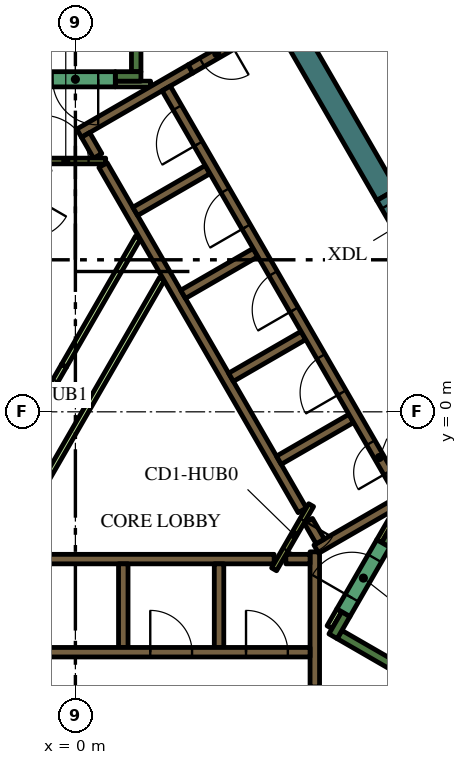
"""IFC4 building model, lengths in metres.
Left out: names, types, materials, properties, quantities, classifications, styles, units other than length and angle.
Written with IfcOpenShell. Run it as: python <this file> out.ifc"""

import sys

from ifc_helpers import new_model, si_unit, direction, frame, frame_2d, origin, place, context, subcontext, project, spatial, rectangle, extrude, element, fill, save


model = new_model("IFC4")
c1 = context("Model", 3, precision=1e-05, world=origin(), true_north=direction((0.0, 1.0)))
c2 = subcontext(c1, "Body", "Model", "MODEL_VIEW")
j1 = project(units=[si_unit("LENGTHUNIT", "METRE"), si_unit("PLANEANGLEUNIT", "RADIAN")], contexts=[c1])
p1 = place(None, origin())
s1 = spatial("IfcSite", under=j1, at=p1, CompositionType="ELEMENT")
p2 = place(p1, origin())
s2 = spatial("IfcBuilding", under=s1, at=p2, CompositionType="ELEMENT")
p3 = place(p2, frame((0.0, 0.0, 296.4)))
s3 = spatial("IfcBuildingStorey", under=s2, at=p3, CompositionType="ELEMENT", Elevation=296.4)
p4 = place(p3, frame((8.192, 5.711, 0.0), z_axis=(0.0, 0.0, 1.0), x_axis=(-0.500006836656, 0.866021456604, 0.0)))
e1 = element("IfcWall", 1, at=p4, inside=s3, PredefinedType="SOLIDWALL", context=c2, shape_type="SweptSolid", body=[
    extrude(rectangle(XDim=5.078, YDim=0.6, at=frame_2d((2.539, 0.0))), origin(), (0.0, 0.0, 1.0), 4.2),
])
p5 = place(p3, frame((12.84, -9.261, 0.0), z_axis=(0.0, 0.0, 1.0), x_axis=(-0.866013990052, 0.500019768644, 0.0)))
e2 = element("IfcWall", 2, at=p5, inside=s3, PredefinedType="SOLIDWALL", context=c2, shape_type="SweptSolid", body=[
    extrude(rectangle(XDim=6.8, YDim=0.25, at=frame_2d((3.4, 0.0))), origin(), (0.0, 0.0, 1.0), 4.2),
])
p6 = place(p3, frame((6.78, -5.906, 0.0), z_axis=(0.0, 0.0, 1.0), x_axis=(0.500223362819, 0.865896406789, 0.0)))
e3 = element("IfcWall", 3, at=p6, inside=s3, PredefinedType="SOLIDWALL", context=c2, shape_type="SweptSolid", body=[
    extrude(rectangle(XDim=0.675, YDim=0.25, at=frame_2d((0.337, 0.0))), origin(), (0.0, 0.0, 1.0), 4.2),
])
p7 = place(p3, frame((8.168, -3.503, 0.0), z_axis=(0.0, 0.0, 1.0), x_axis=(0.49972245349, 0.866185586049, 0.0)))
e4 = element("IfcWall", 4, at=p7, inside=s3, PredefinedType="SOLIDWALL", context=c2, shape_type="SweptSolid", body=[
    extrude(rectangle(XDim=0.425, YDim=0.25, at=frame_2d((0.212, 0.0))), origin(), (0.0, 0.0, 1.0), 4.2),
])
p8 = place(p3, frame((1.6, 8.95, 0.0), z_axis=(0.0, 0.0, 1.0), x_axis=(0.0, 1.0, 0.0)))
e5 = element("IfcWall", 5, at=p8, inside=s3, PredefinedType="SOLIDWALL", context=c2, shape_type="SweptSolid", body=[
    extrude(rectangle(XDim=6.8, YDim=0.25, at=frame_2d((3.4, 0.0))), origin(), (0.0, 0.0, 1.0), 4.2),
])
p9 = place(p3, frame((1.05, 8.825, 0.0), z_axis=(0.0, 0.0, 1.0), x_axis=(1.0, 0.0, 0.0)))
e6 = element("IfcWall", 6, at=p9, inside=s3, PredefinedType="SOLIDWALL", context=c2, shape_type="SweptSolid", body=[
    extrude(rectangle(XDim=0.675, YDim=0.25, at=frame_2d((0.337, 0.0))), origin(), (0.0, 0.0, 1.0), 4.2),
])
p10 = place(p3, frame((6.3, -7.24, 0.0), z_axis=(0.0, 0.0, 1.0), x_axis=(0.0, 1.0, 0.0)))
e7 = element("IfcWall", 7, at=p10, inside=s3, PredefinedType="SOLIDWALL", context=c2, shape_type="SweptSolid", body=[
    extrude(rectangle(XDim=3.556, YDim=0.25, at=frame_2d((1.778, 0.0))), origin(), (0.0, 0.0, 1.0), 4.2),
])
p11 = place(p3, frame((5.538, -3.875, 0.0), z_axis=(0.0, 0.0, 1.0), x_axis=(1.0, 0.0, 0.0)))
e8 = element("IfcWall", 8, at=p11, inside=s3, PredefinedType="SOLIDWALL", context=c2, shape_type="SweptSolid", body=[
    extrude(rectangle(XDim=0.637, YDim=0.25, at=frame_2d((0.318, 0.0))), origin(), (0.0, 0.0, 1.0), 4.2),
])
p12 = place(p3, frame((-5.259, -3.875, 0.0), z_axis=(0.0, 0.0, 1.0), x_axis=(1.0, 0.0, 0.0)))
e9 = element("IfcWall", 9, at=p12, inside=s3, PredefinedType="SOLIDWALL", context=c2, shape_type="SweptSolid", body=[
    extrude(rectangle(XDim=10.489, YDim=0.25, at=frame_2d((5.244, 0.0))), origin(), (0.0, 0.0, 1.0), 4.2),
])
for number, where, z_axis, x_axis in (
    (10, (1.26, -4.0, 0.0), (0.0, 0.0, 1.0), (0.0, -1.0, 0.0)),
    (11, (3.78, -4.0, 0.0), (0.0, 0.0, 1.0), (0.0, -1.0, 0.0)),
):
    element("IfcWall", number, at=place(p3, frame(where, z_axis=z_axis, x_axis=x_axis)), inside=s3, PredefinedType="SOLIDWALL", context=c2, shape_type="SweptSolid", body=[
        extrude(rectangle(XDim=2.2, YDim=0.25, at=frame_2d((1.1, 0.0))), origin(), (0.0, 0.0, 1.0), 4.2),
    ])
p13 = place(p3, frame((9.19, -1.969, 0.0), z_axis=(0.0, 0.0, 1.0), x_axis=(-0.866057109641, -0.499945079824, 0.0)))
e12 = element("IfcWall", 12, at=p13, inside=s3, PredefinedType="SOLIDWALL", context=c2, shape_type="SweptSolid", body=[
    extrude(rectangle(XDim=3.291, YDim=0.25, at=frame_2d((1.646, 0.0))), origin(), (0.0, 0.0, 1.0), 4.2),
])
p14 = place(p3, frame((6.13, -2.867, 0.0), z_axis=(0.0, 0.0, 1.0), x_axis=(0.500160776593, -0.865932559475, 0.0)))
e13 = element("IfcWall", 13, at=p14, inside=s3, PredefinedType="SOLIDWALL", context=c2, shape_type="SweptSolid", body=[
    extrude(rectangle(XDim=0.627, YDim=0.25, at=frame_2d((0.313, 0.0))), origin(), (0.0, 0.0, 1.0), 4.2),
])
p15 = place(p3, frame((3.028, 9.023, 0.0), z_axis=(0.0, 0.0, 1.0), x_axis=(-0.866036587186, -0.49998062928, 0.0)))
e14 = element("IfcWall", 14, at=p15, inside=s3, PredefinedType="SOLIDWALL", context=c2, shape_type="SweptSolid", body=[
    extrude(rectangle(XDim=3.384, YDim=0.25, at=frame_2d((1.692, 0.0))), origin(), (0.0, 0.0, 1.0), 4.2),
])
p16 = place(p3, frame((0.268, 7.285, 0.0), z_axis=(0.0, 0.0, 1.0), x_axis=(0.500098681536, -0.865968422476, 0.0)))
e15 = element("IfcWall", 15, at=p16, inside=s3, PredefinedType="SOLIDWALL", context=c2, shape_type="SweptSolid", body=[
    extrude(rectangle(XDim=0.636, YDim=0.25, at=frame_2d((0.318, 0.0))), origin(), (0.0, 0.0, 1.0), 4.2),
])
p17 = place(p3, frame((5.97, -2.591, 0.0), z_axis=(0.0, 0.0, 1.0), x_axis=(-0.499994469932, 0.866028596547, 0.0)))
e16 = element("IfcWall", 16, at=p17, inside=s3, PredefinedType="SOLIDWALL", context=c2, shape_type="SweptSolid", body=[
    extrude(rectangle(XDim=10.488, YDim=0.25, at=frame_2d((5.244, 0.0))), origin(), (0.0, 0.0, 1.0), 4.2),
])
p18 = place(p3, frame((1.574, 5.274, 0.0), z_axis=(0.0, 0.0, 1.0), x_axis=(0.866028486751, 0.499994660107, 0.0)))
e17 = element("IfcWall", 17, at=p18, inside=s3, PredefinedType="SOLIDWALL", context=c2, shape_type="SweptSolid", body=[
    extrude(rectangle(XDim=2.2, YDim=0.25, at=frame_2d((1.1, 0.0))), origin(), (0.0, 0.0, 1.0), 4.2),
])
for number, where, z_axis, x_axis in (
    (18, (2.834, 3.091, 0.0), (0.0, 0.0, 1.0), (0.866, 0.5, 0.0)),
    (19, (4.094, 0.909, 0.0), (0.0, 0.0, 1.0), (0.866, 0.5, 0.0)),
    (20, (5.354, -1.274, 0.0), (0.0, 0.0, 1.0), (0.866, 0.5, 0.0)),
):
    element("IfcWall", number, at=place(p3, frame(where, z_axis=z_axis, x_axis=x_axis)), inside=s3, PredefinedType="SOLIDWALL", context=c2, shape_type="SweptSolid", body=[
        extrude(rectangle(XDim=2.2, YDim=0.25, at=frame_2d((1.1, 0.0))), origin(), (0.0, 0.0, 1.0), 4.2),
    ])
p19 = place(p3, frame((1.05, 8.625, 0.0), z_axis=(0.0, 0.0, 1.0), x_axis=(1.0, 0.0, 0.0)))
e21 = element("IfcWall", 21, at=p19, inside=s3, PredefinedType="PARTITIONING", context=c2, shape_type="SweptSolid", body=[
    extrude(rectangle(XDim=0.929, YDim=0.15, at=frame_2d((0.464, 0.0))), origin(), (0.0, 0.0, 1.0), 3.55),
])
p20 = place(p3, frame((6.945, -5.222, 0.0), z_axis=(0.0, 0.0, 1.0), x_axis=(-0.499818422106, -0.866130212453, 0.0)))
e22 = element("IfcWall", 22, at=p20, inside=s3, PredefinedType="PARTITIONING", context=c2, shape_type="SweptSolid", body=[
    extrude(rectangle(XDim=0.514, YDim=0.15, at=frame_2d((0.257, 0.0))), origin(), (0.0, 0.0, 1.0), 3.55),
])
p21 = place(p3, frame((8.459, -2.599, 0.0), z_axis=(0.0, 0.0, 1.0), x_axis=(-0.500041054325, -0.866001699761, 0.0)))
e23 = element("IfcWall", 23, at=p21, inside=s3, PredefinedType="PARTITIONING", context=c2, shape_type="SweptSolid", body=[
    extrude(rectangle(XDim=0.929, YDim=0.15, at=frame_2d((0.464, 0.0))), origin(), (0.0, 0.0, 1.0), 4.2),
])
p22 = place(p3, frame((-1.887, -3.718, 0.0), z_axis=(0.0, 0.0, 1.0), x_axis=(0.500005008002, 0.866022512394, 0.0)))
e24 = element("IfcWall", 24, at=p22, inside=s3, PredefinedType="PARTITIONING", context=c2, shape_type="SweptSolid", body=[
    extrude(rectangle(XDim=8.327, YDim=0.15, at=frame_2d((4.164, 0.0))), origin(), (0.0, 0.0, 1.0), 3.55),
])
p23 = place(p3, frame((-0.3, 1.212, 0.0), z_axis=(0.0, 0.0, 1.0), x_axis=(0.499963101113, 0.866046706318, 0.0)))
e25 = element("IfcWall", 25, at=p23, inside=s3, PredefinedType="PARTITIONING", context=c2, shape_type="SweptSolid", body=[
    extrude(rectangle(XDim=3.893, YDim=0.15, at=frame_2d((1.947, 0.0))), origin(), (0.0, 0.0, 1.0), 3.55),
])
p24 = place(p3, frame((-6.175, -6.325, 0.0), z_axis=(0.0, 0.0, 1.0), x_axis=(1.0, 0.0, 0.0)))
e26 = element("IfcWall", 26, at=p24, inside=s3, PredefinedType="SOLIDWALL", context=c2, shape_type="SweptSolid", body=[
    extrude(rectangle(XDim=12.35, YDim=0.25, at=frame_2d((6.175, 0.0))), origin(), (0.0, 0.0, 1.0), 4.2),
])
p25 = place(p24, frame((3.205, 0.0, 0.0)))
e27 = element("IfcOpeningElement", 27, at=p25, cuts=e26, PredefinedType="OPENING", context=c2, shape_type="SweptSolid", body=[
    extrude(rectangle(XDim=0.9, YDim=2.1, at=frame_2d((0.45, 1.05))), frame((0.0, 0.135, 0.0), z_axis=(0.0, -1.0, 0.0), x_axis=(1.0, 0.0, 0.0)), (0.0, 0.0, 1.0), 0.27),
])
p26 = place(p24, frame((8.145, 0.0, 0.0)))
e28 = element("IfcOpeningElement", 28, at=p26, cuts=e26, PredefinedType="OPENING", context=c2, shape_type="SweptSolid", body=[
    extrude(rectangle(XDim=1.1, YDim=2.1, at=frame_2d((0.55, 1.05))), frame((0.0, 0.135, 0.0), z_axis=(0.0, -1.0, 0.0), x_axis=(1.0, 0.0, 0.0)), (0.0, 0.0, 1.0), 0.27),
])
p27 = place(p24, frame((10.665, 0.0, 0.0)))
e29 = element("IfcOpeningElement", 29, at=p27, cuts=e26, PredefinedType="OPENING", context=c2, shape_type="SweptSolid", body=[
    extrude(rectangle(XDim=1.1, YDim=2.1, at=frame_2d((0.55, 1.05))), frame((0.0, 0.135, 0.0), z_axis=(0.0, -1.0, 0.0), x_axis=(1.0, 0.0, 0.0)), (0.0, 0.0, 1.0), 0.27),
])
p28 = place(p3, frame((8.565, -2.185, 0.0), z_axis=(0.0, 0.0, 1.0), x_axis=(-0.499997954832, 0.866026584559, 0.0)))
e30 = element("IfcWall", 30, at=p28, inside=s3, PredefinedType="SOLIDWALL", context=c2, shape_type="SweptSolid", body=[
    extrude(rectangle(XDim=12.35, YDim=0.25, at=frame_2d((6.175, 0.0))), origin(), (0.0, 0.0, 1.0), 4.2),
])
p29 = place(p28, frame((0.685, 0.0, 0.0)))
e31 = element("IfcOpeningElement", 31, at=p29, cuts=e30, PredefinedType="OPENING", context=c2, shape_type="SweptSolid", body=[
    extrude(rectangle(XDim=0.9, YDim=2.1, at=frame_2d((0.45, 1.05))), frame((0.0, 0.135, 0.0), z_axis=(0.0, -1.0, 0.0), x_axis=(1.0, 0.0, 0.0)), (0.0, 0.0, 1.0), 0.27),
])
p30 = place(p28, frame((3.105, 0.0, 0.0)))
e32 = element("IfcOpeningElement", 32, at=p30, cuts=e30, PredefinedType="OPENING", context=c2, shape_type="SweptSolid", body=[
    extrude(rectangle(XDim=1.1, YDim=2.1, at=frame_2d((0.55, 1.05))), frame((0.0, 0.135, 0.0), z_axis=(0.0, -1.0, 0.0), x_axis=(1.0, 0.0, 0.0)), (0.0, 0.0, 1.0), 0.27),
])
p31 = place(p28, frame((5.625, 0.0, 0.0)))
e33 = element("IfcOpeningElement", 33, at=p31, cuts=e30, PredefinedType="OPENING", context=c2, shape_type="SweptSolid", body=[
    extrude(rectangle(XDim=1.1, YDim=2.1, at=frame_2d((0.55, 1.05))), frame((0.0, 0.135, 0.0), z_axis=(0.0, -1.0, 0.0), x_axis=(1.0, 0.0, 0.0)), (0.0, 0.0, 1.0), 0.27),
])
p32 = place(p28, frame((8.145, 0.0, 0.0)))
e34 = element("IfcOpeningElement", 34, at=p32, cuts=e30, PredefinedType="OPENING", context=c2, shape_type="SweptSolid", body=[
    extrude(rectangle(XDim=1.1, YDim=2.1, at=frame_2d((0.55, 1.05))), frame((0.0, 0.135, 0.0), z_axis=(0.0, -1.0, 0.0), x_axis=(1.0, 0.0, 0.0)), (0.0, 0.0, 1.0), 0.27),
])
p33 = place(p28, frame((10.665, 0.0, 0.0)))
e35 = element("IfcOpeningElement", 35, at=p33, cuts=e30, PredefinedType="OPENING", context=c2, shape_type="SweptSolid", body=[
    extrude(rectangle(XDim=1.1, YDim=2.1, at=frame_2d((0.55, 1.05))), frame((0.0, 0.135, 0.0), z_axis=(0.0, -1.0, 0.0), x_axis=(1.0, 0.0, 0.0)), (0.0, 0.0, 1.0), 0.27),
])
p34 = place(p3, frame((7.053, -5.284, 0.0), z_axis=(0.0, 0.0, 1.0), x_axis=(0.500078061341, 0.865980330357, 0.0)))
e36 = element("IfcWall", 36, at=p34, inside=s3, PredefinedType="SOLIDWALL", context=c2, shape_type="SweptSolid", body=[
    extrude(rectangle(XDim=2.1, YDim=0.4, at=frame_2d((1.05, 0.0))), origin(), (0.0, 0.0, 1.0), 4.2),
])
p35 = place(p34, frame((0.45, 0.0, 0.0)))
e37 = element("IfcOpeningElement", 37, at=p35, cuts=e36, PredefinedType="OPENING", context=c2, shape_type="SweptSolid", body=[
    extrude(rectangle(XDim=1.2, YDim=2.1, at=frame_2d((0.6, 1.05))), frame((0.0, 0.21, 0.0), z_axis=(0.0, -1.0, 0.0), x_axis=(1.0, 0.0, 0.0)), (0.0, 0.0, 1.0), 0.42),
])
p36 = place(p3, frame((1.05, 8.75, 0.0), z_axis=(0.0, 0.0, 1.0), x_axis=(-1.0, 0.0, 0.0)))
e38 = element("IfcWall", 38, at=p36, inside=s3, PredefinedType="SOLIDWALL", context=c2, shape_type="SweptSolid", body=[
    extrude(rectangle(XDim=2.1, YDim=0.4, at=frame_2d((1.05, 0.0))), origin(), (0.0, 0.0, 1.0), 4.2),
])
p37 = place(p36, frame((0.45, 0.0, 0.0)))
e39 = element("IfcOpeningElement", 39, at=p37, cuts=e38, PredefinedType="OPENING", context=c2, shape_type="SweptSolid", body=[
    extrude(rectangle(XDim=1.2, YDim=2.1, at=frame_2d((0.6, 1.05))), frame((0.0, 0.21, 0.0), z_axis=(0.0, -1.0, 0.0), x_axis=(1.0, 0.0, 0.0)), (0.0, 0.0, 1.0), 0.42),
])
p38 = place(p3, frame((5.366, 10.373, 0.0), z_axis=(0.0, 0.0, 1.0), x_axis=(-0.866019956843, -0.50000943426, 0.0)))
e40 = element("IfcWall", 40, at=p38, inside=s3, PredefinedType="SOLIDWALL", context=c2, shape_type="SweptSolid", body=[
    extrude(rectangle(XDim=2.7, YDim=0.25, at=frame_2d((1.35, 0.0))), origin(), (0.0, 0.0, 1.0), 4.2),
])
p39 = place(p38, frame((1.45, 0.0, 0.0)))
e41 = element("IfcOpeningElement", 41, at=p39, cuts=e40, PredefinedType="OPENING", context=c2, shape_type="SweptSolid", body=[
    extrude(rectangle(XDim=0.9, YDim=2.1, at=frame_2d((0.45, 1.05))), frame((0.0, 0.135, 0.0), z_axis=(0.0, -1.0, 0.0), x_axis=(1.0, 0.0, 0.0)), (0.0, 0.0, 1.0), 0.27),
])
p40 = place(p3, frame((6.203, -2.456, 0.0), z_axis=(0.0, 0.0, 1.0), x_axis=(-0.500043961785, -0.866000020948, 0.0)))
e42 = element("IfcWall", 42, at=p40, inside=s3, PredefinedType="PARTITIONING", context=c2, shape_type="SweptSolid", body=[
    extrude(rectangle(XDim=1.95, YDim=0.15, at=frame_2d((0.975, 0.0))), origin(), (0.0, 0.0, 1.0), 4.2),
])
p41 = place(p40, frame((0.45, 0.0, 0.0)))
e43 = element("IfcOpeningElement", 43, at=p41, cuts=e42, PredefinedType="OPENING", context=c2, shape_type="SweptSolid", body=[
    extrude(rectangle(XDim=0.9, YDim=2.1, at=frame_2d((0.45, 1.05))), frame((0.0, 0.085, 0.0), z_axis=(0.0, -1.0, 0.0), x_axis=(1.0, 0.0, 0.0)), (0.0, 0.0, 1.0), 0.17),
])
p42 = place(p3, frame((-1.303, 6.6, 0.0), z_axis=(0.0, 0.0, 1.0), x_axis=(1.0, 0.0, 0.0)))
e44 = element("IfcWall", 44, at=p42, inside=s3, PredefinedType="PARTITIONING", context=c2, shape_type="SweptSolid", body=[
    extrude(rectangle(XDim=2.1, YDim=0.15, at=frame_2d((1.05, 0.0))), origin(), (0.0, 0.0, 1.0), 4.2),
])
p43 = place(p42, frame((0.45, 0.0, 0.0)))
e45 = element("IfcOpeningElement", 45, at=p43, cuts=e44, PredefinedType="OPENING", context=c2, shape_type="SweptSolid", body=[
    extrude(rectangle(XDim=1.2, YDim=2.1, at=frame_2d((0.6, 1.05))), frame((0.0, 0.085, 0.0), z_axis=(0.0, -1.0, 0.0), x_axis=(1.0, 0.0, 0.0)), (0.0, 0.0, 1.0), 0.17),
])
p44 = place(p3, frame((8.192, 5.711, 0.0), z_axis=(0.0, 0.0, 1.0), x_axis=(0.500062241894, -0.865989465428, 0.0)))
e46 = element("IfcWall", 46, at=p44, inside=s3, PredefinedType="SOLIDWALL", context=c2, shape_type="SweptSolid", body=[
    extrude(rectangle(XDim=1.7, YDim=0.6, at=frame_2d((0.85, 0.0))), origin(), (0.0, 0.0, 1.0), 4.2),
])
p45 = place(p44, frame((0.25, 0.0, 0.0)))
e47 = element("IfcOpeningElement", 47, at=p45, cuts=e46, PredefinedType="OPENING", context=c2, shape_type="SweptSolid", body=[
    extrude(rectangle(XDim=1.2, YDim=2.1, at=frame_2d((0.6, 1.05))), frame((0.0, 0.31, 0.0), z_axis=(0.0, -1.0, 0.0), x_axis=(1.0, 0.0, 0.0)), (0.0, 0.0, 1.0), 0.62),
])
p46 = place(p3, frame((-1.2, -0.346, 0.0), z_axis=(0.0, 0.0, 1.0), x_axis=(0.499961193289, 0.866047807691, 0.0)))
e48 = element("IfcWall", 48, at=p46, inside=s3, PredefinedType="PARTITIONING", context=c2, shape_type="SweptSolid", body=[
    extrude(rectangle(XDim=1.8, YDim=0.15, at=frame_2d((0.9, 0.0))), origin(), (0.0, 0.0, 1.0), 3.55),
])
p47 = place(p46, frame((0.45, 0.0, 0.0)))
e49 = element("IfcOpeningElement", 49, at=p47, cuts=e48, PredefinedType="OPENING", context=c2, shape_type="SweptSolid", body=[
    extrude(rectangle(XDim=0.9, YDim=2.1, at=frame_2d((0.45, 1.05))), frame((0.0, 0.085, 0.0), z_axis=(0.0, -1.0, 0.0), x_axis=(1.0, 0.0, 0.0)), (0.0, 0.0, 1.0), 0.17),
])
p48 = place(p3, frame((13.436, 0.829, 0.0), z_axis=(0.0, 0.0, 1.0), x_axis=(-0.49999894854, 0.866026010844, 0.0)))
e50 = element("IfcWall", 50, at=p48, inside=s3, PredefinedType="PARTITIONING", context=c2, shape_type="SweptSolid", body=[
    extrude(rectangle(XDim=12.0, YDim=0.2, at=frame_2d((6.0, 0.0))), origin(), (0.0, 0.0, 1.0), 3.55),
])
p49 = place(p48, frame((5.5, 0.0, 0.0)))
e51 = element("IfcOpeningElement", 51, at=p49, cuts=e50, PredefinedType="OPENING", context=c2, shape_type="SweptSolid", body=[
    extrude(rectangle(XDim=1.0, YDim=2.1, at=frame_2d((0.5, 1.05))), frame((0.0, 0.11, 0.0), z_axis=(0.0, -1.0, 0.0), x_axis=(1.0, 0.0, 0.0)), (0.0, 0.0, 1.0), 0.22),
])
p50 = place(p26, origin())
e52 = element("IfcDoor", 52, at=p50, inside=s3, OperationType="DOUBLE_DOOR_SLIDING", PredefinedType="DOOR", context=c2, shape_type="SweptSolid", body=[
    extrude(rectangle(XDim=1.1, YDim=2.1, at=frame_2d((0.55, 1.05))), frame((0.0, 0.025, 0.0), z_axis=(0.0, -1.0, 0.0), x_axis=(1.0, 0.0, 0.0)), (0.0, 0.0, 1.0), 0.05),
])
fill(e28, e52)
p51 = place(p27, origin())
e53 = element("IfcDoor", 53, at=p51, inside=s3, OperationType="DOUBLE_DOOR_SLIDING", PredefinedType="DOOR", context=c2, shape_type="SweptSolid", body=[
    extrude(rectangle(XDim=1.1, YDim=2.1, at=frame_2d((0.55, 1.05))), frame((0.0, 0.025, 0.0), z_axis=(0.0, -1.0, 0.0), x_axis=(1.0, 0.0, 0.0)), (0.0, 0.0, 1.0), 0.05),
])
fill(e29, e53)
p52 = place(p29, origin())
e54 = element("IfcDoor", 54, at=p52, inside=s3, OperationType="SINGLE_SWING_LEFT", PredefinedType="DOOR", context=c2, shape_type="SweptSolid", body=[
    extrude(rectangle(XDim=0.9, YDim=2.1, at=frame_2d((0.45, 1.05))), frame((0.0, 0.025, 0.0), z_axis=(0.0, -1.0, 0.0), x_axis=(1.0, 0.0, 0.0)), (0.0, 0.0, 1.0), 0.05),
])
fill(e31, e54)
p53 = place(p30, origin())
e55 = element("IfcDoor", 55, at=p53, inside=s3, OperationType="DOUBLE_DOOR_SLIDING", PredefinedType="DOOR", context=c2, shape_type="SweptSolid", body=[
    extrude(rectangle(XDim=1.1, YDim=2.1, at=frame_2d((0.55, 1.05))), frame((0.0, 0.025, 0.0), z_axis=(0.0, -1.0, 0.0), x_axis=(1.0, 0.0, 0.0)), (0.0, 0.0, 1.0), 0.05),
])
fill(e32, e55)
p54 = place(p31, origin())
e56 = element("IfcDoor", 56, at=p54, inside=s3, OperationType="DOUBLE_DOOR_SLIDING", PredefinedType="DOOR", context=c2, shape_type="SweptSolid", body=[
    extrude(rectangle(XDim=1.1, YDim=2.1, at=frame_2d((0.55, 1.05))), frame((0.0, 0.025, 0.0), z_axis=(0.0, -1.0, 0.0), x_axis=(1.0, 0.0, 0.0)), (0.0, 0.0, 1.0), 0.05),
])
fill(e33, e56)
p55 = place(p32, origin())
e57 = element("IfcDoor", 57, at=p55, inside=s3, OperationType="DOUBLE_DOOR_SLIDING", PredefinedType="DOOR", context=c2, shape_type="SweptSolid", body=[
    extrude(rectangle(XDim=1.1, YDim=2.1, at=frame_2d((0.55, 1.05))), frame((0.0, 0.025, 0.0), z_axis=(0.0, -1.0, 0.0), x_axis=(1.0, 0.0, 0.0)), (0.0, 0.0, 1.0), 0.05),
])
fill(e34, e57)
p56 = place(p33, origin())
e58 = element("IfcDoor", 58, at=p56, inside=s3, OperationType="DOUBLE_DOOR_SLIDING", PredefinedType="DOOR", context=c2, shape_type="SweptSolid", body=[
    extrude(rectangle(XDim=1.1, YDim=2.1, at=frame_2d((0.55, 1.05))), frame((0.0, 0.025, 0.0), z_axis=(0.0, -1.0, 0.0), x_axis=(1.0, 0.0, 0.0)), (0.0, 0.0, 1.0), 0.05),
])
fill(e35, e58)
p57 = place(p35, origin())
e59 = element("IfcDoor", 59, at=p57, inside=s3, OperationType="SINGLE_SWING_LEFT", PredefinedType="DOOR", context=c2, shape_type="SweptSolid", body=[
    extrude(rectangle(XDim=1.2, YDim=2.1, at=frame_2d((0.6, 1.05))), frame((0.0, 0.025, 0.0), z_axis=(0.0, -1.0, 0.0), x_axis=(1.0, 0.0, 0.0)), (0.0, 0.0, 1.0), 0.05),
])
fill(e37, e59)
p58 = place(p37, origin())
e60 = element("IfcDoor", 60, at=p58, inside=s3, OperationType="SINGLE_SWING_LEFT", PredefinedType="DOOR", context=c2, shape_type="SweptSolid", body=[
    extrude(rectangle(XDim=1.2, YDim=2.1, at=frame_2d((0.6, 1.05))), frame((0.0, 0.025, 0.0), z_axis=(0.0, -1.0, 0.0), x_axis=(1.0, 0.0, 0.0)), (0.0, 0.0, 1.0), 0.05),
])
fill(e39, e60)
p59 = place(p39, origin())
e61 = element("IfcDoor", 61, at=p59, inside=s3, OperationType="SINGLE_SWING_LEFT", PredefinedType="DOOR", context=c2, shape_type="SweptSolid", body=[
    extrude(rectangle(XDim=0.9, YDim=2.1, at=frame_2d((0.45, 1.05))), frame((0.0, 0.025, 0.0), z_axis=(0.0, -1.0, 0.0), x_axis=(1.0, 0.0, 0.0)), (0.0, 0.0, 1.0), 0.05),
])
fill(e41, e61)
p60 = place(p41, origin())
e62 = element("IfcDoor", 62, at=p60, inside=s3, OperationType="SINGLE_SWING_LEFT", PredefinedType="DOOR", context=c2, shape_type="SweptSolid", body=[
    extrude(rectangle(XDim=0.9, YDim=2.1, at=frame_2d((0.45, 1.05))), frame((0.0, 0.025, 0.0), z_axis=(0.0, -1.0, 0.0), x_axis=(1.0, 0.0, 0.0)), (0.0, 0.0, 1.0), 0.05),
])
fill(e43, e62)
p61 = place(p43, origin())
e63 = element("IfcDoor", 63, at=p61, inside=s3, OperationType="SINGLE_SWING_LEFT", PredefinedType="DOOR", context=c2, shape_type="SweptSolid", body=[
    extrude(rectangle(XDim=1.2, YDim=2.1, at=frame_2d((0.6, 1.05))), frame((0.0, 0.025, 0.0), z_axis=(0.0, -1.0, 0.0), x_axis=(1.0, 0.0, 0.0)), (0.0, 0.0, 1.0), 0.05),
])
fill(e45, e63)
p62 = place(p47, origin())
e64 = element("IfcDoor", 64, at=p62, inside=s3, OperationType="SINGLE_SWING_LEFT", PredefinedType="DOOR", context=c2, shape_type="SweptSolid", body=[
    extrude(rectangle(XDim=0.9, YDim=2.1, at=frame_2d((0.45, 1.05))), frame((0.0, 0.025, 0.0), z_axis=(0.0, -1.0, 0.0), x_axis=(1.0, 0.0, 0.0)), (0.0, 0.0, 1.0), 0.05),
])
fill(e49, e64)
save(model, sys.argv[1])
